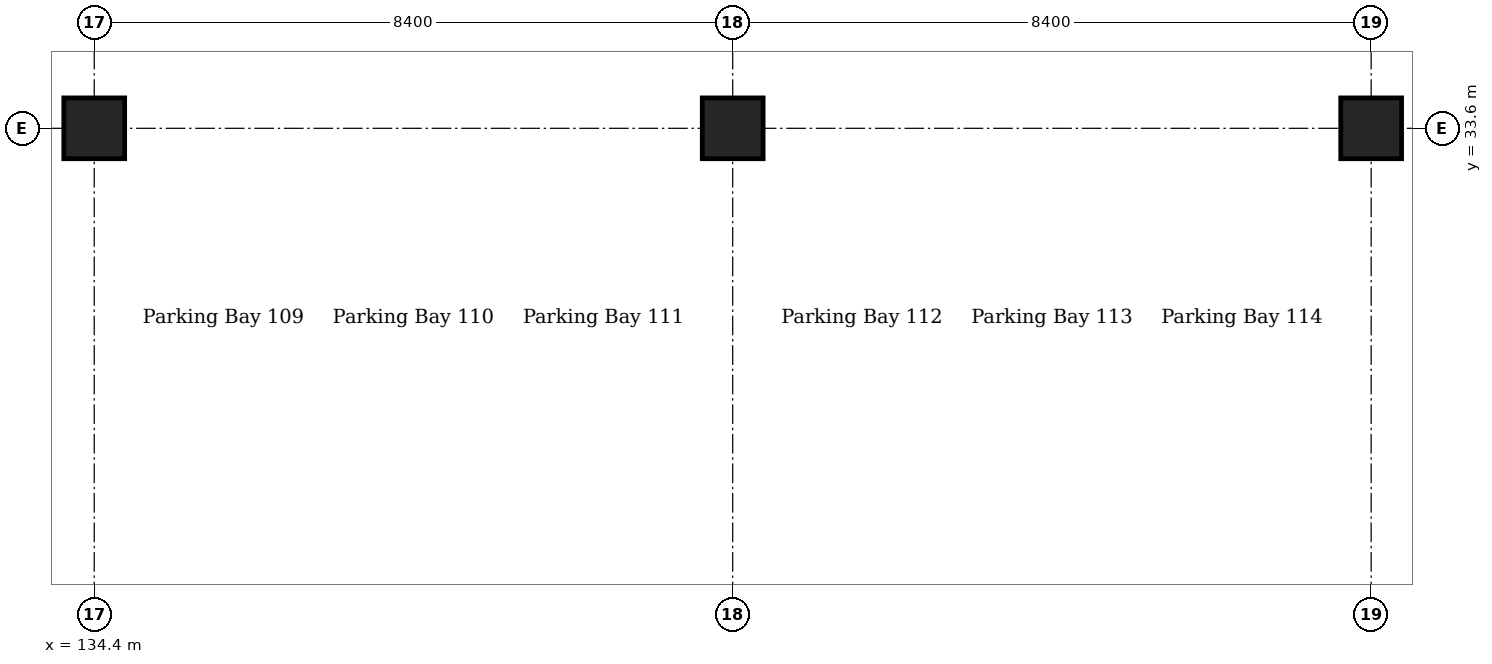
"""IFC4 building model, lengths in metres.
Left out: names, types, materials, properties, quantities, classifications, styles, units other than length and angle.
Written with IfcOpenShell. Run it as: python <this file> out.ifc"""

import sys

from ifc_helpers import new_model, si_unit, direction, frame, origin, origin_2d, place, context, subcontext, project, spatial, rectangle, extrude, element, save


model = new_model("IFC4")
c1 = context("Model", 3, precision=1e-05, world=origin(), true_north=direction((0.0, 1.0)))
c2 = subcontext(c1, "Body", "Model", "MODEL_VIEW")
j1 = project(units=[si_unit("LENGTHUNIT", "METRE"), si_unit("PLANEANGLEUNIT", "RADIAN")], contexts=[c1])
p1 = place(None, origin())
s1 = spatial("IfcSite", under=j1, at=p1, CompositionType="ELEMENT")
p2 = place(p1, origin())
s2 = spatial("IfcBuilding", under=s1, at=p2, CompositionType="ELEMENT")
p3 = place(p2, frame((0.0, 0.0, -5.4)))
s3 = spatial("IfcBuildingStorey", under=s2, at=p3, CompositionType="ELEMENT", Elevation=-5.4)
for number, where, z_axis, x_axis in (
    (1, (134.4, 33.6, 0.0), (0.0, 0.0, 1.0), (1.0, 0.0, 0.0)),
    (2, (142.8, 33.6, 0.0), (0.0, 0.0, 1.0), (1.0, 0.0, 0.0)),
    (3, (151.2, 33.6, 0.0), (0.0, 0.0, 1.0), (1.0, 0.0, 0.0)),
):
    element("IfcColumn", number, at=place(p3, frame(where, z_axis=z_axis, x_axis=x_axis)), inside=s3, PredefinedType="COLUMN", context=c2, shape_type="SweptSolid", body=[
        extrude(rectangle(XDim=0.8, YDim=0.8, at=origin_2d()), origin(), (0.0, 0.0, 1.0), 5.4),
    ])
save(model, sys.argv[1])
